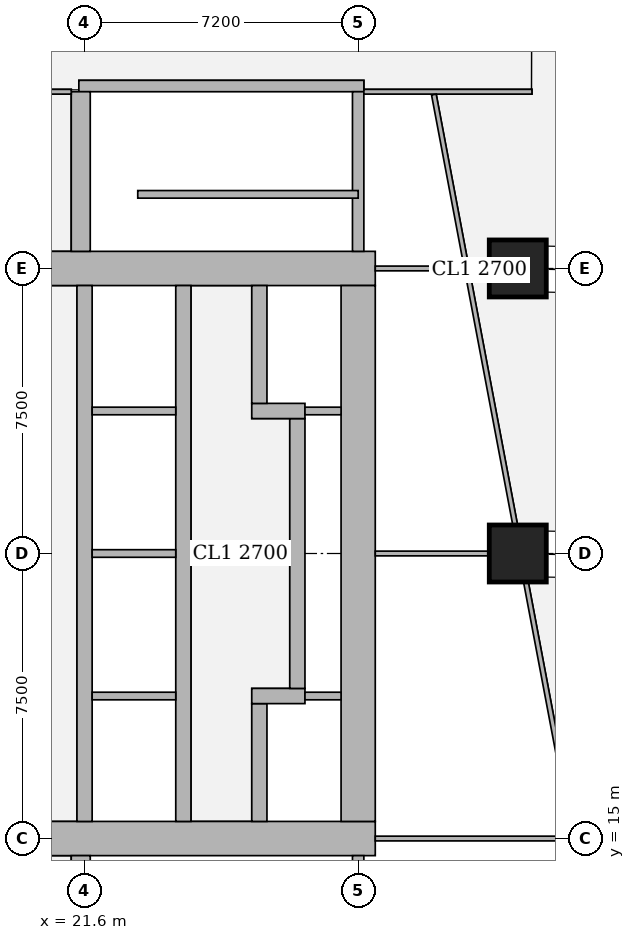
"""IFC4 building model, lengths in metres.
Left out: names, types, materials, properties, quantities, classifications, styles, units other than length and angle.
Written with IfcOpenShell. Run it as: python <this file> out.ifc"""

import sys

from ifc_helpers import new_model, si_unit, direction, frame, frame_2d, origin, origin_2d, place, context, subcontext, project, spatial, rectangle, extrude, element, fill, save


model = new_model("IFC4")
c1 = context("Model", 3, precision=1e-05, world=origin(), true_north=direction((0.0, 1.0)))
c2 = subcontext(c1, "Body", "Model", "MODEL_VIEW")
j1 = project(units=[si_unit("LENGTHUNIT", "METRE"), si_unit("PLANEANGLEUNIT", "RADIAN")], contexts=[c1])
p1 = place(None, origin())
s1 = spatial("IfcSite", under=j1, at=p1, CompositionType="ELEMENT")
p2 = place(p1, origin())
s2 = spatial("IfcBuilding", under=s1, at=p2, CompositionType="ELEMENT")
p3 = place(p2, frame((0.0, 0.0, 158.3)))
s3 = spatial("IfcBuildingStorey", under=s2, at=p3, CompositionType="ELEMENT", Elevation=158.3)
for number, where, z_axis, x_axis in (
    (1, (33.0, 22.5, 0.0), (0.0, 0.0, 1.0), (1.0, 0.0, 0.0)),
    (2, (33.0, 30.0, 0.0), (0.0, 0.0, 1.0), (1.0, 0.0, 0.0)),
):
    element("IfcColumn", number, at=place(p3, frame(where, z_axis=z_axis, x_axis=x_axis)), inside=s3, PredefinedType="COLUMN", context=c2, shape_type="SweptSolid", body=[
        extrude(rectangle(XDim=1.5, YDim=1.5, at=origin_2d()), origin(), (0.0, 0.0, 1.0), 3.75),
    ])
p4 = place(p3, frame((13.95, 15.0, 0.0), z_axis=(0.0, 0.0, 1.0), x_axis=(1.0, 0.0, 0.0)))
e3 = element("IfcWall", 3, at=p4, inside=s3, PredefinedType="SHEAR", context=c2, shape_type="SweptSolid", body=[
    extrude(rectangle(XDim=15.3, YDim=0.9, at=frame_2d((7.65, 0.0))), origin(), (0.0, 0.0, 1.0), 3.75),
])
p5 = place(p4, frame((4.45, 0.0, 0.0)))
e4 = element("IfcOpeningElement", 4, at=p5, cuts=e3, PredefinedType="OPENING", context=c2, shape_type="SweptSolid", body=[
    extrude(rectangle(XDim=1.8, YDim=2.1, at=frame_2d((0.9, 1.05))), frame((0.0, 0.46, 0.0), z_axis=(0.0, -1.0, 0.0), x_axis=(1.0, 0.0, 0.0)), (0.0, 0.0, 1.0), 0.92),
])
p6 = place(p4, frame((10.7, 0.0, 0.0)))
e5 = element("IfcOpeningElement", 5, at=p6, cuts=e3, PredefinedType="OPENING", context=c2, shape_type="SweptSolid", body=[
    extrude(rectangle(XDim=1.1, YDim=2.1, at=frame_2d((0.55, 1.05))), frame((0.0, 0.46, 0.0), z_axis=(0.0, -1.0, 0.0), x_axis=(1.0, 0.0, 0.0)), (0.0, 0.0, 1.0), 0.92),
])
p7 = place(p3, frame((13.95, 30.0, 0.0), z_axis=(0.0, 0.0, 1.0), x_axis=(1.0, 0.0, 0.0)))
e6 = element("IfcWall", 6, at=p7, inside=s3, PredefinedType="SHEAR", context=c2, shape_type="SweptSolid", body=[
    extrude(rectangle(XDim=15.3, YDim=0.9, at=frame_2d((7.65, 0.0))), origin(), (0.0, 0.0, 1.0), 3.75),
])
p8 = place(p7, frame((4.45, 0.0, 0.0)))
e7 = element("IfcOpeningElement", 7, at=p8, cuts=e6, PredefinedType="OPENING", context=c2, shape_type="SweptSolid", body=[
    extrude(rectangle(XDim=1.8, YDim=2.1, at=frame_2d((0.9, 1.05))), frame((0.0, 0.46, 0.0), z_axis=(0.0, -1.0, 0.0), x_axis=(1.0, 0.0, 0.0)), (0.0, 0.0, 1.0), 0.92),
])
p9 = place(p7, frame((10.7, 0.0, 0.0)))
e8 = element("IfcOpeningElement", 8, at=p9, cuts=e6, PredefinedType="OPENING", context=c2, shape_type="SweptSolid", body=[
    extrude(rectangle(XDim=1.1, YDim=2.1, at=frame_2d((0.55, 1.05))), frame((0.0, 0.46, 0.0), z_axis=(0.0, -1.0, 0.0), x_axis=(1.0, 0.0, 0.0)), (0.0, 0.0, 1.0), 0.92),
])
p10 = place(p3, frame((28.8, 15.45, 0.0), z_axis=(0.0, 0.0, 1.0), x_axis=(0.0, 1.0, 0.0)))
e9 = element("IfcWall", 9, at=p10, inside=s3, PredefinedType="SHEAR", context=c2, shape_type="SweptSolid", body=[
    extrude(rectangle(XDim=14.1, YDim=0.9, at=frame_2d((7.05, 0.0))), origin(), (0.0, 0.0, 1.0), 3.75),
])
p11 = place(p3, frame((21.6, 15.45, 0.0), z_axis=(0.0, 0.0, 1.0), x_axis=(0.0, 1.0, 0.0)))
e10 = element("IfcWall", 10, at=p11, inside=s3, PredefinedType="SHEAR", context=c2, shape_type="SweptSolid", body=[
    extrude(rectangle(XDim=14.1, YDim=0.4, at=frame_2d((7.05, 0.0))), origin(), (0.0, 0.0, 1.0), 3.75),
])
p12 = place(p11, frame((0.875, 0.0, 0.0)))
e11 = element("IfcOpeningElement", 11, at=p12, cuts=e10, PredefinedType="OPENING", context=c2, shape_type="SweptSolid", body=[
    extrude(rectangle(XDim=1.1, YDim=2.1, at=frame_2d((0.55, 1.05))), frame((0.0, 0.21, 0.0), z_axis=(0.0, -1.0, 0.0), x_axis=(1.0, 0.0, 0.0)), (0.0, 0.0, 1.0), 0.42),
])
p13 = place(p11, frame((4.625, 0.0, 0.0)))
e12 = element("IfcOpeningElement", 12, at=p13, cuts=e10, PredefinedType="OPENING", context=c2, shape_type="SweptSolid", body=[
    extrude(rectangle(XDim=1.1, YDim=2.1, at=frame_2d((0.55, 1.05))), frame((0.0, 0.21, 0.0), z_axis=(0.0, -1.0, 0.0), x_axis=(1.0, 0.0, 0.0)), (0.0, 0.0, 1.0), 0.42),
])
p14 = place(p11, frame((8.375, 0.0, 0.0)))
e13 = element("IfcOpeningElement", 13, at=p14, cuts=e10, PredefinedType="OPENING", context=c2, shape_type="SweptSolid", body=[
    extrude(rectangle(XDim=1.1, YDim=2.1, at=frame_2d((0.55, 1.05))), frame((0.0, 0.21, 0.0), z_axis=(0.0, -1.0, 0.0), x_axis=(1.0, 0.0, 0.0)), (0.0, 0.0, 1.0), 0.42),
])
p15 = place(p11, frame((12.125, 0.0, 0.0)))
e14 = element("IfcOpeningElement", 14, at=p15, cuts=e10, PredefinedType="OPENING", context=c2, shape_type="SweptSolid", body=[
    extrude(rectangle(XDim=1.1, YDim=2.1, at=frame_2d((0.55, 1.05))), frame((0.0, 0.21, 0.0), z_axis=(0.0, -1.0, 0.0), x_axis=(1.0, 0.0, 0.0)), (0.0, 0.0, 1.0), 0.42),
])
p16 = place(p3, frame((24.2, 15.45, 0.0), z_axis=(0.0, 0.0, 1.0), x_axis=(0.0, 1.0, 0.0)))
e15 = element("IfcWall", 15, at=p16, inside=s3, PredefinedType="SHEAR", context=c2, shape_type="SweptSolid", body=[
    extrude(rectangle(XDim=14.1, YDim=0.4, at=frame_2d((7.05, 0.0))), origin(), (0.0, 0.0, 1.0), 3.75),
])
p17 = place(p3, frame((26.2, 15.45, 0.0), z_axis=(0.0, 0.0, 1.0), x_axis=(0.0, 1.0, 0.0)))
e16 = element("IfcWall", 16, at=p17, inside=s3, PredefinedType="SHEAR", context=c2, shape_type="SweptSolid", body=[
    extrude(rectangle(XDim=3.1, YDim=0.4, at=frame_2d((1.55, 0.0))), origin(), (0.0, 0.0, 1.0), 3.75),
])
p18 = place(p17, frame((0.825, 0.0, 0.0)))
e17 = element("IfcOpeningElement", 17, at=p18, cuts=e16, PredefinedType="OPENING", context=c2, shape_type="SweptSolid", body=[
    extrude(rectangle(XDim=1.2, YDim=2.1, at=frame_2d((0.6, 1.05))), frame((0.0, 0.21, 0.0), z_axis=(0.0, -1.0, 0.0), x_axis=(1.0, 0.0, 0.0)), (0.0, 0.0, 1.0), 0.42),
])
p19 = place(p3, frame((26.0, 18.75, 0.0), z_axis=(0.0, 0.0, 1.0), x_axis=(1.0, 0.0, 0.0)))
e18 = element("IfcWall", 18, at=p19, inside=s3, PredefinedType="SHEAR", context=c2, shape_type="SweptSolid", body=[
    extrude(rectangle(XDim=1.4, YDim=0.4, at=frame_2d((0.7, 0.0))), origin(), (0.0, 0.0, 1.0), 3.75),
])
p20 = place(p3, frame((27.2, 18.95, 0.0), z_axis=(0.0, 0.0, 1.0), x_axis=(0.0, 1.0, 0.0)))
e19 = element("IfcWall", 19, at=p20, inside=s3, PredefinedType="SHEAR", context=c2, shape_type="SweptSolid", body=[
    extrude(rectangle(XDim=7.1, YDim=0.4, at=frame_2d((3.55, 0.0))), origin(), (0.0, 0.0, 1.0), 3.75),
])
p21 = place(p3, frame((26.0, 26.25, 0.0), z_axis=(0.0, 0.0, 1.0), x_axis=(1.0, 0.0, 0.0)))
e20 = element("IfcWall", 20, at=p21, inside=s3, PredefinedType="SHEAR", context=c2, shape_type="SweptSolid", body=[
    extrude(rectangle(XDim=1.4, YDim=0.4, at=frame_2d((0.7, 0.0))), origin(), (0.0, 0.0, 1.0), 3.75),
])
p22 = place(p3, frame((26.2, 26.45, 0.0), z_axis=(0.0, 0.0, 1.0), x_axis=(0.0, 1.0, 0.0)))
e21 = element("IfcWall", 21, at=p22, inside=s3, PredefinedType="SHEAR", context=c2, shape_type="SweptSolid", body=[
    extrude(rectangle(XDim=3.1, YDim=0.4, at=frame_2d((1.55, 0.0))), origin(), (0.0, 0.0, 1.0), 3.75),
])
p23 = place(p22, frame((1.075, 0.0, 0.0)))
e22 = element("IfcOpeningElement", 22, at=p23, cuts=e21, PredefinedType="OPENING", context=c2, shape_type="SweptSolid", body=[
    extrude(rectangle(XDim=1.2, YDim=2.1, at=frame_2d((0.6, 1.05))), frame((0.0, 0.21, 0.0), z_axis=(0.0, -1.0, 0.0), x_axis=(1.0, 0.0, 0.0)), (0.0, 0.0, 1.0), 0.42),
])
p24 = place(p3, frame((21.5, 10.35, 0.0), z_axis=(0.0, 0.0, 1.0), x_axis=(0.0, 1.0, 0.0)))
e23 = element("IfcWall", 23, at=p24, inside=s3, PredefinedType="SHEAR", context=c2, shape_type="SweptSolid", body=[
    extrude(rectangle(XDim=4.2, YDim=0.5, at=frame_2d((2.1, 0.0))), origin(), (0.0, 0.0, 1.0), 3.75),
])
p25 = place(p3, frame((28.8, 10.35, 0.0), z_axis=(0.0, 0.0, 1.0), x_axis=(0.0, 1.0, 0.0)))
e24 = element("IfcWall", 24, at=p25, inside=s3, PredefinedType="SHEAR", context=c2, shape_type="SweptSolid", body=[
    extrude(rectangle(XDim=4.2, YDim=0.3, at=frame_2d((2.1, 0.0))), origin(), (0.0, 0.0, 1.0), 3.75),
])
p26 = place(p3, frame((21.45, 34.8, 0.0), z_axis=(0.0, 0.0, 1.0), x_axis=(1.0, 0.0, 0.0)))
e25 = element("IfcWall", 25, at=p26, inside=s3, PredefinedType="SHEAR", context=c2, shape_type="SweptSolid", body=[
    extrude(rectangle(XDim=7.5, YDim=0.3, at=frame_2d((3.75, 0.0))), origin(), (0.0, 0.0, 1.0), 3.75),
])
p27 = place(p26, frame((0.5, 0.0, 0.0)))
e26 = element("IfcOpeningElement", 26, at=p27, cuts=e25, PredefinedType="OPENING", context=c2, shape_type="SweptSolid", body=[
    extrude(rectangle(XDim=1.1, YDim=2.1, at=frame_2d((0.55, 1.05))), frame((0.0, 0.16, 0.0), z_axis=(0.0, -1.0, 0.0), x_axis=(1.0, 0.0, 0.0)), (0.0, 0.0, 1.0), 0.32),
])
p28 = place(p3, frame((21.5, 30.45, 0.0), z_axis=(0.0, 0.0, 1.0), x_axis=(0.0, 1.0, 0.0)))
e27 = element("IfcWall", 27, at=p28, inside=s3, PredefinedType="SHEAR", context=c2, shape_type="SweptSolid", body=[
    extrude(rectangle(XDim=4.2, YDim=0.5, at=frame_2d((2.1, 0.0))), origin(), (0.0, 0.0, 1.0), 3.75),
])
p29 = place(p3, frame((28.8, 30.45, 0.0), z_axis=(0.0, 0.0, 1.0), x_axis=(0.0, 1.0, 0.0)))
e28 = element("IfcWall", 28, at=p29, inside=s3, PredefinedType="SHEAR", context=c2, shape_type="SweptSolid", body=[
    extrude(rectangle(XDim=4.2, YDim=0.3, at=frame_2d((2.1, 0.0))), origin(), (0.0, 0.0, 1.0), 3.75),
])
p30 = place(p3, frame((33.623, 43.022, 0.0), z_axis=(0.0, 0.0, 1.0), x_axis=(0.185596841028, -0.98262597798, 0.0)))
e29 = element("IfcWall", 29, at=p30, inside=s3, PredefinedType="SOLIDWALL", context=c2, shape_type="SweptSolid", body=[
    extrude(rectangle(XDim=41.66, YDim=0.15, at=frame_2d((20.83, 0.0))), origin(), (0.0, 0.0, 1.0), 2.5),
])
p31 = place(p30, frame((21.514, 0.0, 0.0)))
e30 = element("IfcOpeningElement", 30, at=p31, cuts=e29, PredefinedType="OPENING", context=c2, shape_type="SweptSolid", body=[
    extrude(rectangle(XDim=1.0, YDim=2.1, at=frame_2d((0.5, 1.05))), frame((0.0, 0.085, 0.0), z_axis=(0.0, -1.0, 0.0), x_axis=(1.0, 0.0, 0.0)), (0.0, 0.0, 1.0), 0.17),
])
p32 = place(p30, frame((27.062, 0.0, 0.0)))
e31 = element("IfcOpeningElement", 31, at=p32, cuts=e29, PredefinedType="OPENING", context=c2, shape_type="SweptSolid", body=[
    extrude(rectangle(XDim=1.0, YDim=2.1, at=frame_2d((0.5, 1.05))), frame((0.0, 0.085, 0.0), z_axis=(0.0, -1.0, 0.0), x_axis=(1.0, 0.0, 0.0)), (0.0, 0.0, 1.0), 0.17),
])
p33 = place(p30, frame((29.934, 0.0, 0.0)))
e32 = element("IfcOpeningElement", 32, at=p33, cuts=e29, PredefinedType="OPENING", context=c2, shape_type="SweptSolid", body=[
    extrude(rectangle(XDim=1.0, YDim=2.1, at=frame_2d((0.5, 1.05))), frame((0.0, 0.085, 0.0), z_axis=(0.0, -1.0, 0.0), x_axis=(1.0, 0.0, 0.0)), (0.0, 0.0, 1.0), 0.17),
])
p34 = place(p3, frame((10.413, 34.65, 0.0), z_axis=(0.0, 0.0, 1.0), x_axis=(1.0, 0.0, 0.0)))
e33 = element("IfcWall", 33, at=p34, inside=s3, PredefinedType="PARTITIONING", context=c2, shape_type="SweptSolid", body=[
    extrude(rectangle(XDim=10.837, YDim=0.125, at=frame_2d((5.418, 0.0))), origin(), (0.0, 0.0, 1.0), 3.5),
])
p35 = place(p34, frame((7.487, 0.0, 0.0)))
e34 = element("IfcOpeningElement", 34, at=p35, cuts=e33, PredefinedType="OPENING", context=c2, shape_type="SweptSolid", body=[
    extrude(rectangle(XDim=1.8, YDim=2.1, at=frame_2d((0.9, 1.05))), frame((0.0, 0.073, 0.0), z_axis=(0.0, -1.0, 0.0), x_axis=(1.0, 0.0, 0.0)), (0.0, 0.0, 1.0), 0.145),
])
p36 = place(p3, frame((28.95, 34.65, 0.0), z_axis=(0.0, 0.0, 1.0), x_axis=(1.0, 0.0, 0.0)))
e35 = element("IfcWall", 35, at=p36, inside=s3, PredefinedType="PARTITIONING", context=c2, shape_type="SweptSolid", body=[
    extrude(rectangle(XDim=4.423, YDim=0.125, at=frame_2d((2.211, 0.0))), origin(), (0.0, 0.0, 1.0), 3.5),
])
p37 = place(p3, frame((35.354, 10.424, 0.0), z_axis=(0.0, 0.0, 1.0), x_axis=(-0.185612234763, 0.982623070311, 0.0)))
e36 = element("IfcWall", 36, at=p37, inside=s3, PredefinedType="PARTITIONING", context=c2, shape_type="SweptSolid", body=[
    extrude(rectangle(XDim=11.513, YDim=0.125, at=frame_2d((5.756, 0.0))), origin(), (0.0, 0.0, 1.0), 3.5),
])
p38 = place(p37, frame((0.697, 0.0, 0.0)))
e37 = element("IfcOpeningElement", 37, at=p38, cuts=e36, PredefinedType="OPENING", context=c2, shape_type="SweptSolid", body=[
    extrude(rectangle(XDim=1.0, YDim=2.1, at=frame_2d((0.5, 1.05))), frame((0.0, 0.073, 0.0), z_axis=(0.0, -1.0, 0.0), x_axis=(1.0, 0.0, 0.0)), (0.0, 0.0, 1.0), 0.145),
])
p39 = place(p37, frame((5.48, 0.0, 0.0)))
e38 = element("IfcOpeningElement", 38, at=p39, cuts=e36, PredefinedType="OPENING", context=c2, shape_type="SweptSolid", body=[
    extrude(rectangle(XDim=1.0, YDim=2.1, at=frame_2d((0.5, 1.05))), frame((0.0, 0.073, 0.0), z_axis=(0.0, -1.0, 0.0), x_axis=(1.0, 0.0, 0.0)), (0.0, 0.0, 1.0), 0.145),
])
p40 = place(p3, frame((32.929, 23.263, 0.0), z_axis=(0.0, 0.0, 1.0), x_axis=(-0.185612234763, 0.982623070311, 0.0)))
e39 = element("IfcWall", 39, at=p40, inside=s3, PredefinedType="PARTITIONING", context=c2, shape_type="SweptSolid", body=[
    extrude(rectangle(XDim=11.513, YDim=0.125, at=frame_2d((5.756, 0.0))), origin(), (0.0, 0.0, 1.0), 3.5),
])
p41 = place(p40, frame((0.15, 0.0, 0.0)))
e40 = element("IfcOpeningElement", 40, at=p41, cuts=e39, PredefinedType="OPENING", context=c2, shape_type="SweptSolid", body=[
    extrude(rectangle(XDim=1.0, YDim=2.1, at=frame_2d((0.5, 1.05))), frame((0.0, 0.073, 0.0), z_axis=(0.0, -1.0, 0.0), x_axis=(1.0, 0.0, 0.0)), (0.0, 0.0, 1.0), 0.145),
])
p42 = place(p40, frame((7.679, 0.0, 0.0)))
e41 = element("IfcOpeningElement", 41, at=p42, cuts=e39, PredefinedType="OPENING", context=c2, shape_type="SweptSolid", body=[
    extrude(rectangle(XDim=1.0, YDim=2.1, at=frame_2d((0.5, 1.05))), frame((0.0, 0.073, 0.0), z_axis=(0.0, -1.0, 0.0), x_axis=(1.0, 0.0, 0.0)), (0.0, 0.0, 1.0), 0.145),
])
p43 = place(p3, frame((29.25, 15.0, 0.0), z_axis=(0.0, 0.0, 1.0), x_axis=(1.0, 0.0, 0.0)))
e42 = element("IfcWall", 42, at=p43, inside=s3, PredefinedType="PARTITIONING", context=c2, shape_type="SweptSolid", body=[
    extrude(rectangle(XDim=5.176, YDim=0.125, at=frame_2d((2.588, 0.0))), origin(), (0.0, 0.0, 1.0), 3.5),
])
p44 = place(p3, frame((29.25, 22.5, 0.0), z_axis=(0.0, 0.0, 1.0), x_axis=(1.0, 0.0, 0.0)))
e43 = element("IfcWall", 43, at=p44, inside=s3, PredefinedType="PARTITIONING", context=c2, shape_type="SweptSolid", body=[
    extrude(rectangle(XDim=2.999, YDim=0.125, at=frame_2d((1.5, 0.0))), origin(), (0.0, 0.0, 1.0), 3.5),
])
p45 = place(p3, frame((29.25, 30.0, 0.0), z_axis=(0.0, 0.0, 1.0), x_axis=(1.0, 0.0, 0.0)))
e44 = element("IfcWall", 44, at=p45, inside=s3, PredefinedType="PARTITIONING", context=c2, shape_type="SweptSolid", body=[
    extrude(rectangle(XDim=2.342, YDim=0.125, at=frame_2d((1.171, 0.0))), origin(), (0.0, 0.0, 1.0), 3.5),
])
p46 = place(p3, frame((23.0, 31.95, 0.0), z_axis=(0.0, 0.0, 1.0), x_axis=(1.0, 0.0, 0.0)))
e45 = element("IfcWall", 45, at=p46, inside=s3, PredefinedType="SHEAR", context=c2, shape_type="SweptSolid", body=[
    extrude(rectangle(XDim=5.8, YDim=0.2, at=frame_2d((2.9, 0.0))), origin(), (0.0, 0.0, 1.0), 3.75),
])
for number, where, z_axis, x_axis in (
    (46, (21.8, 18.75, 0.0), (0.0, 0.0, 1.0), (1.0, 0.0, 0.0)),
    (47, (21.8, 22.5, 0.0), (0.0, 0.0, 1.0), (1.0, 0.0, 0.0)),
    (48, (21.8, 26.25, 0.0), (0.0, 0.0, 1.0), (1.0, 0.0, 0.0)),
):
    element("IfcWall", number, at=place(p3, frame(where, z_axis=z_axis, x_axis=x_axis)), inside=s3, PredefinedType="SOLIDWALL", context=c2, shape_type="SweptSolid", body=[
        extrude(rectangle(XDim=2.2, YDim=0.2, at=frame_2d((1.1, 0.0))), origin(), (0.0, 0.0, 1.0), 3.5),
    ])
for number, where, z_axis, x_axis in (
    (49, (27.4, 18.75, 0.0), (0.0, 0.0, 1.0), (1.0, 0.0, 0.0)),
    (50, (27.4, 26.25, 0.0), (0.0, 0.0, 1.0), (1.0, 0.0, 0.0)),
):
    element("IfcWall", number, at=place(p3, frame(where, z_axis=z_axis, x_axis=x_axis)), inside=s3, PredefinedType="SOLIDWALL", context=c2, shape_type="SweptSolid", body=[
        extrude(rectangle(XDim=0.95, YDim=0.2, at=frame_2d((0.475, 0.0))), origin(), (0.0, 0.0, 1.0), 3.5),
    ])
p47 = place(p41, origin())
e51 = element("IfcDoor", 51, at=p47, inside=s3, OperationType="SINGLE_SWING_LEFT", PredefinedType="DOOR", context=c2, shape_type="SweptSolid", body=[
    extrude(rectangle(XDim=1.0, YDim=2.1, at=frame_2d((0.5, 1.05))), frame((0.0, 0.025, 0.0), z_axis=(0.0, -1.0, 0.0), x_axis=(1.0, 0.0, 0.0)), (0.0, 0.0, 1.0), 0.05),
])
fill(e40, e51)
p48 = place(p42, origin())
e52 = element("IfcDoor", 52, at=p48, inside=s3, OperationType="SINGLE_SWING_LEFT", PredefinedType="DOOR", context=c2, shape_type="SweptSolid", body=[
    extrude(rectangle(XDim=1.0, YDim=2.1, at=frame_2d((0.5, 1.05))), frame((0.0, 0.025, 0.0), z_axis=(0.0, -1.0, 0.0), x_axis=(1.0, 0.0, 0.0)), (0.0, 0.0, 1.0), 0.05),
])
fill(e41, e52)
p49 = place(p6, origin())
e53 = element("IfcDoor", 53, at=p49, inside=s3, OperationType="SINGLE_SWING_RIGHT", PredefinedType="DOOR", context=c2, shape_type="SweptSolid", body=[
    extrude(rectangle(XDim=1.1, YDim=2.1, at=frame_2d((0.55, 1.05))), frame((0.0, 0.025, 0.0), z_axis=(0.0, -1.0, 0.0), x_axis=(1.0, 0.0, 0.0)), (0.0, 0.0, 1.0), 0.05),
])
fill(e5, e53)
p50 = place(p9, origin())
e54 = element("IfcDoor", 54, at=p50, inside=s3, OperationType="SINGLE_SWING_RIGHT", PredefinedType="DOOR", context=c2, shape_type="SweptSolid", body=[
    extrude(rectangle(XDim=1.1, YDim=2.1, at=frame_2d((0.55, 1.05))), frame((0.0, 0.025, 0.0), z_axis=(0.0, -1.0, 0.0), x_axis=(1.0, 0.0, 0.0)), (0.0, 0.0, 1.0), 0.05),
])
fill(e8, e54)
p51 = place(p18, origin())
e55 = element("IfcDoor", 55, at=p51, inside=s3, OperationType="DOUBLE_DOOR_SLIDING", PredefinedType="DOOR", context=c2, shape_type="SweptSolid", body=[
    extrude(rectangle(XDim=1.2, YDim=2.1, at=frame_2d((0.6, 1.05))), frame((0.0, 0.025, 0.0), z_axis=(0.0, -1.0, 0.0), x_axis=(1.0, 0.0, 0.0)), (0.0, 0.0, 1.0), 0.05),
])
fill(e17, e55)
p52 = place(p23, origin())
e56 = element("IfcDoor", 56, at=p52, inside=s3, OperationType="DOUBLE_DOOR_SLIDING", PredefinedType="DOOR", context=c2, shape_type="SweptSolid", body=[
    extrude(rectangle(XDim=1.2, YDim=2.1, at=frame_2d((0.6, 1.05))), frame((0.0, 0.025, 0.0), z_axis=(0.0, -1.0, 0.0), x_axis=(1.0, 0.0, 0.0)), (0.0, 0.0, 1.0), 0.05),
])
fill(e22, e56)
p53 = place(p12, origin())
e57 = element("IfcDoor", 57, at=p53, inside=s3, OperationType="DOUBLE_DOOR_SLIDING", PredefinedType="DOOR", context=c2, shape_type="SweptSolid", body=[
    extrude(rectangle(XDim=1.1, YDim=2.1, at=frame_2d((0.55, 1.05))), frame((0.0, 0.025, 0.0), z_axis=(0.0, -1.0, 0.0), x_axis=(1.0, 0.0, 0.0)), (0.0, 0.0, 1.0), 0.05),
])
fill(e11, e57)
p54 = place(p13, origin())
e58 = element("IfcDoor", 58, at=p54, inside=s3, OperationType="DOUBLE_DOOR_SLIDING", PredefinedType="DOOR", context=c2, shape_type="SweptSolid", body=[
    extrude(rectangle(XDim=1.1, YDim=2.1, at=frame_2d((0.55, 1.05))), frame((0.0, 0.025, 0.0), z_axis=(0.0, -1.0, 0.0), x_axis=(1.0, 0.0, 0.0)), (0.0, 0.0, 1.0), 0.05),
])
fill(e12, e58)
p55 = place(p14, origin())
e59 = element("IfcDoor", 59, at=p55, inside=s3, OperationType="DOUBLE_DOOR_SLIDING", PredefinedType="DOOR", context=c2, shape_type="SweptSolid", body=[
    extrude(rectangle(XDim=1.1, YDim=2.1, at=frame_2d((0.55, 1.05))), frame((0.0, 0.025, 0.0), z_axis=(0.0, -1.0, 0.0), x_axis=(1.0, 0.0, 0.0)), (0.0, 0.0, 1.0), 0.05),
])
fill(e13, e59)
p56 = place(p15, origin())
e60 = element("IfcDoor", 60, at=p56, inside=s3, OperationType="DOUBLE_DOOR_SLIDING", PredefinedType="DOOR", context=c2, shape_type="SweptSolid", body=[
    extrude(rectangle(XDim=1.1, YDim=2.1, at=frame_2d((0.55, 1.05))), frame((0.0, 0.025, 0.0), z_axis=(0.0, -1.0, 0.0), x_axis=(1.0, 0.0, 0.0)), (0.0, 0.0, 1.0), 0.05),
])
fill(e14, e60)
p57 = place(p27, origin())
e61 = element("IfcDoor", 61, at=p57, inside=s3, OperationType="SINGLE_SWING_RIGHT", PredefinedType="DOOR", context=c2, shape_type="SweptSolid", body=[
    extrude(rectangle(XDim=1.1, YDim=2.1, at=frame_2d((0.55, 1.05))), frame((0.0, 0.025, 0.0), z_axis=(0.0, -1.0, 0.0), x_axis=(1.0, 0.0, 0.0)), (0.0, 0.0, 1.0), 0.05),
])
fill(e26, e61)
save(model, sys.argv[1])
